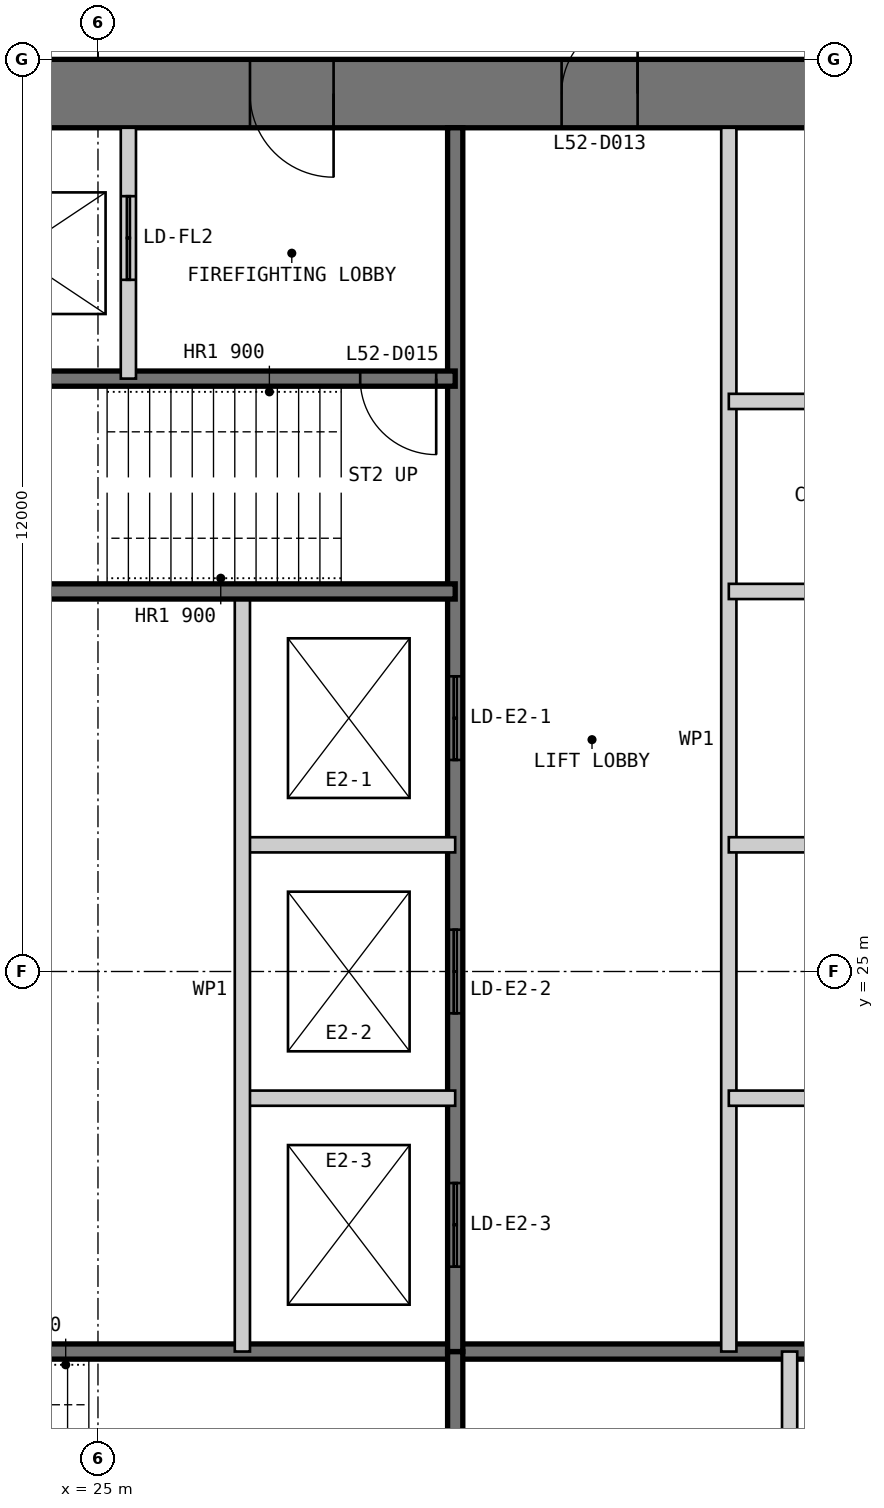
"""IFC4 building model, lengths in metres.
Left out: names, types, materials, properties, quantities, classifications, styles, units other than length and angle.
Written with IfcOpenShell. Run it as: python <this file> out.ifc"""

import sys

from ifc_helpers import new_model, si_unit, direction, frame, frame_2d, origin, place, context, subcontext, project, spatial, polyline, rectangle, outline, extrude, element, fill, save


model = new_model("IFC4")
c1 = context("Model", 3, precision=1e-05, world=origin(), true_north=direction((0.0, 1.0)))
c2 = subcontext(c1, "Body", "Model", "MODEL_VIEW")
j1 = project(units=[si_unit("LENGTHUNIT", "METRE"), si_unit("PLANEANGLEUNIT", "RADIAN")], contexts=[c1])
p1 = place(None, origin())
s1 = spatial("IfcSite", under=j1, at=p1, CompositionType="ELEMENT")
p2 = place(p1, origin())
s2 = spatial("IfcBuilding", under=s1, at=p2, CompositionType="ELEMENT")
p3 = place(p2, frame((0.0, 0.0, 221.8)))
s3 = spatial("IfcBuildingStorey", under=s2, at=p3, CompositionType="ELEMENT", Elevation=221.8)
p4 = place(p3, frame((37.0, 36.55, 0.0), z_axis=(0.0, 0.0, 1.0), x_axis=(-1.0, 0.0, 0.0)))
e1 = element("IfcWall", 1, at=p4, inside=s3, PredefinedType="SHEAR", context=c2, shape_type="SweptSolid", body=[
    extrude(outline(polyline([(0.0, -0.45), (24.0, -0.45), (23.1, 0.45), (0.9, 0.45), (0.0, -0.45)])), origin(), (0.0, 0.0, 1.0), 4.0),
])
p5 = place(p4, frame((4.9, 0.0, 0.0)))
e2 = element("IfcOpeningElement", 2, at=p5, cuts=e1, PredefinedType="OPENING", context=c2, shape_type="SweptSolid", body=[
    extrude(rectangle(XDim=1.0, YDim=2.2, at=frame_2d((0.5, 1.1))), frame((0.0, 0.46, 0.0), z_axis=(0.0, -1.0, 0.0), x_axis=(1.0, 0.0, 0.0)), (0.0, 0.0, 1.0), 0.92),
])
p6 = place(p4, frame((8.9, 0.0, 0.0)))
e3 = element("IfcOpeningElement", 3, at=p6, cuts=e1, PredefinedType="OPENING", context=c2, shape_type="SweptSolid", body=[
    extrude(rectangle(XDim=1.1, YDim=2.2, at=frame_2d((0.55, 1.1))), frame((0.0, 0.46, 0.0), z_axis=(0.0, -1.0, 0.0), x_axis=(1.0, 0.0, 0.0)), (0.0, 0.0, 1.0), 0.92),
])
p7 = place(p4, frame((15.05, 0.0, 0.0)))
e4 = element("IfcOpeningElement", 4, at=p7, cuts=e1, PredefinedType="OPENING", context=c2, shape_type="SweptSolid", body=[
    extrude(rectangle(XDim=0.9, YDim=2.2, at=frame_2d((0.45, 1.1))), frame((0.0, 0.46, 0.0), z_axis=(0.0, -1.0, 0.0), x_axis=(1.0, 0.0, 0.0)), (0.0, 0.0, 1.0), 0.92),
])
p8 = place(p4, frame((17.9, 0.0, 0.0)))
e5 = element("IfcOpeningElement", 5, at=p8, cuts=e1, PredefinedType="OPENING", context=c2, shape_type="SweptSolid", body=[
    extrude(rectangle(XDim=1.0, YDim=2.2, at=frame_2d((0.5, 1.1))), frame((0.0, 0.46, 0.0), z_axis=(0.0, -1.0, 0.0), x_axis=(1.0, 0.0, 0.0)), (0.0, 0.0, 1.0), 0.92),
])
p9 = place(p4, frame((21.4, 0.0, 0.0)))
e6 = element("IfcOpeningElement", 6, at=p9, cuts=e1, PredefinedType="OPENING", context=c2, shape_type="SweptSolid", body=[
    extrude(rectangle(XDim=1.0, YDim=2.2, at=frame_2d((0.5, 1.1))), frame((0.0, 0.46, 0.0), z_axis=(0.0, -1.0, 0.0), x_axis=(1.0, 0.0, 0.0)), (0.0, 0.0, 1.0), 0.92),
])
p10 = place(p3, frame((20.3, 20.0, 0.0), z_axis=(0.0, 0.0, 1.0), x_axis=(1.0, 0.0, 0.0)))
e7 = element("IfcWall", 7, at=p10, inside=s3, PredefinedType="SOLIDWALL", context=c2, shape_type="SweptSolid", body=[
    extrude(rectangle(XDim=15.8, YDim=0.2, at=frame_2d((7.9, 0.0))), origin(), (0.0, 0.0, 1.0), 3.8),
])
p11 = place(p3, frame((29.7, 13.9, 0.0), z_axis=(0.0, 0.0, 1.0), x_axis=(0.0, 1.0, 0.0)))
e8 = element("IfcWall", 8, at=p11, inside=s3, PredefinedType="SOLIDWALL", context=c2, shape_type="SweptSolid", body=[
    extrude(rectangle(XDim=6.1, YDim=0.2, at=frame_2d((3.05, 0.0))), origin(), (0.0, 0.0, 1.0), 3.8),
])
p12 = place(p3, frame((34.1, 13.9, 0.0), z_axis=(0.0, 0.0, 1.0), x_axis=(0.0, 1.0, 0.0)))
e9 = element("IfcWall", 9, at=p12, inside=s3, PredefinedType="PARTITIONING", context=c2, shape_type="SweptSolid", body=[
    extrude(rectangle(XDim=6.1, YDim=0.2, at=frame_2d((3.05, 0.0))), origin(), (0.0, 0.0, 1.0), 3.8),
])
p13 = place(p3, frame((33.3, 36.1, 0.0), z_axis=(0.0, 0.0, 1.0), x_axis=(0.0, -1.0, 0.0)))
e10 = element("IfcWall", 10, at=p13, inside=s3, PredefinedType="PARTITIONING", context=c2, shape_type="SweptSolid", body=[
    extrude(rectangle(XDim=16.1, YDim=0.2, at=frame_2d((8.05, 0.0))), origin(), (0.0, 0.0, 1.0), 3.8),
])
p14 = place(p3, frame((29.7, 36.1, 0.0), z_axis=(0.0, 0.0, 1.0), x_axis=(0.0, -1.0, 0.0)))
e11 = element("IfcWall", 11, at=p14, inside=s3, PredefinedType="SOLIDWALL", context=c2, shape_type="SweptSolid", body=[
    extrude(rectangle(XDim=16.1, YDim=0.2, at=frame_2d((8.05, 0.0))), origin(), (0.0, 0.0, 1.0), 3.8),
])
p15 = place(p14, frame((7.217, 0.0, 0.0)))
e12 = element("IfcOpeningElement", 12, at=p15, cuts=e11, PredefinedType="OPENING", context=c2, shape_type="SweptSolid", body=[
    extrude(rectangle(XDim=1.1, YDim=2.2, at=frame_2d((0.55, 1.1))), frame((0.0, 0.11, 0.0), z_axis=(0.0, -1.0, 0.0), x_axis=(1.0, 0.0, 0.0)), (0.0, 0.0, 1.0), 0.22),
])
p16 = place(p14, frame((10.55, 0.0, 0.0)))
e13 = element("IfcOpeningElement", 13, at=p16, cuts=e11, PredefinedType="OPENING", context=c2, shape_type="SweptSolid", body=[
    extrude(rectangle(XDim=1.1, YDim=2.2, at=frame_2d((0.55, 1.1))), frame((0.0, 0.11, 0.0), z_axis=(0.0, -1.0, 0.0), x_axis=(1.0, 0.0, 0.0)), (0.0, 0.0, 1.0), 0.22),
])
p17 = place(p14, frame((13.883, 0.0, 0.0)))
e14 = element("IfcOpeningElement", 14, at=p17, cuts=e11, PredefinedType="OPENING", context=c2, shape_type="SweptSolid", body=[
    extrude(rectangle(XDim=1.1, YDim=2.2, at=frame_2d((0.55, 1.1))), frame((0.0, 0.11, 0.0), z_axis=(0.0, -1.0, 0.0), x_axis=(1.0, 0.0, 0.0)), (0.0, 0.0, 1.0), 0.22),
])
for number, where, z_axis, x_axis in (
    (15, (36.1, 30.0, 0.0), (0.0, 0.0, 1.0), (-1.0, 0.0, 0.0)),
    (16, (36.1, 26.667, 0.0), (0.0, 0.0, 1.0), (-1.0, 0.0, 0.0)),
    (17, (36.1, 23.333, 0.0), (0.0, 0.0, 1.0), (-1.0, 0.0, 0.0)),
    (18, (29.7, 26.667, 0.0), (0.0, 0.0, 1.0), (-1.0, 0.0, 0.0)),
    (19, (29.7, 23.333, 0.0), (0.0, 0.0, 1.0), (-1.0, 0.0, 0.0)),
):
    element("IfcWall", number, at=place(p3, frame(where, z_axis=z_axis, x_axis=x_axis)), inside=s3, PredefinedType="PARTITIONING", context=c2, shape_type="SweptSolid", body=[
        extrude(rectangle(XDim=2.8, YDim=0.2, at=frame_2d((1.4, 0.0))), origin(), (0.0, 0.0, 1.0), 3.8),
    ])
p18 = place(p3, frame((26.9, 30.0, 0.0), z_axis=(0.0, 0.0, 1.0), x_axis=(0.0, -1.0, 0.0)))
e20 = element("IfcWall", 20, at=p18, inside=s3, PredefinedType="PARTITIONING", context=c2, shape_type="SweptSolid", body=[
    extrude(rectangle(XDim=10.0, YDim=0.2, at=frame_2d((5.0, 0.0))), origin(), (0.0, 0.0, 1.0), 3.8),
])
p19 = place(p3, frame((29.7, 32.8, 0.0), z_axis=(0.0, 0.0, 1.0), x_axis=(-1.0, 0.0, 0.0)))
e21 = element("IfcWall", 21, at=p19, inside=s3, PredefinedType="SOLIDWALL", context=c2, shape_type="SweptSolid", body=[
    extrude(rectangle(XDim=9.4, YDim=0.2, at=frame_2d((4.7, 0.0))), origin(), (0.0, 0.0, 1.0), 3.8),
])
p20 = place(p19, frame((0.25, 0.0, 0.0)))
e22 = element("IfcOpeningElement", 22, at=p20, cuts=e21, PredefinedType="OPENING", context=c2, shape_type="SweptSolid", body=[
    extrude(rectangle(XDim=1.0, YDim=2.2, at=frame_2d((0.5, 1.1))), frame((0.0, 0.11, 0.0), z_axis=(0.0, -1.0, 0.0), x_axis=(1.0, 0.0, 0.0)), (0.0, 0.0, 1.0), 0.22),
])
p21 = place(p3, frame((29.7, 30.0, 0.0), z_axis=(0.0, 0.0, 1.0), x_axis=(-1.0, 0.0, 0.0)))
e23 = element("IfcWall", 23, at=p21, inside=s3, PredefinedType="SOLIDWALL", context=c2, shape_type="SweptSolid", body=[
    extrude(rectangle(XDim=15.8, YDim=0.2, at=frame_2d((7.9, 0.0))), origin(), (0.0, 0.0, 1.0), 3.8),
])
p22 = place(p3, frame((25.4, 36.1, 0.0), z_axis=(0.0, 0.0, 1.0), x_axis=(0.0, -1.0, 0.0)))
e24 = element("IfcWall", 24, at=p22, inside=s3, PredefinedType="PARTITIONING", context=c2, shape_type="SweptSolid", body=[
    extrude(rectangle(XDim=3.3, YDim=0.2, at=frame_2d((1.65, 0.0))), origin(), (0.0, 0.0, 1.0), 3.8),
])
p23 = place(p22, frame((0.9, 0.0, 0.0)))
e25 = element("IfcOpeningElement", 25, at=p23, cuts=e24, PredefinedType="OPENING", context=c2, shape_type="SweptSolid", body=[
    extrude(rectangle(XDim=1.1, YDim=2.2, at=frame_2d((0.55, 1.1))), frame((0.0, 0.11, 0.0), z_axis=(0.0, -1.0, 0.0), x_axis=(1.0, 0.0, 0.0)), (0.0, 0.0, 1.0), 0.22),
])
p24 = place(p3, frame((36.1, 32.5, 0.0), z_axis=(0.0, 0.0, 1.0), x_axis=(-1.0, 0.0, 0.0)))
e26 = element("IfcWall", 26, at=p24, inside=s3, PredefinedType="PARTITIONING", context=c2, shape_type="SweptSolid", body=[
    extrude(rectangle(XDim=2.8, YDim=0.2, at=frame_2d((1.4, 0.0))), origin(), (0.0, 0.0, 1.0), 3.8),
])
p25 = place(p5, frame((1.0, 0.0, 0.0), z_axis=(0.0, 0.0, 1.0), x_axis=(-1.0, 0.0, 0.0)))
e27 = element("IfcDoor", 27, at=p25, inside=s3, OperationType="SINGLE_SWING_RIGHT", PredefinedType="DOOR", context=c2, shape_type="SweptSolid", body=[
    extrude(rectangle(XDim=1.0, YDim=2.2, at=frame_2d((0.5, 1.1))), frame((0.0, 0.025, 0.0), z_axis=(0.0, -1.0, 0.0), x_axis=(1.0, 0.0, 0.0)), (0.0, 0.0, 1.0), 0.05),
    extrude(outline(polyline([(0.0, 0.0), (0.04, 0.0), (0.04, 2.16), (0.96, 2.16), (0.96, 0.0), (1.0, 0.0), (1.0, 2.2), (0.0, 2.2), (0.0, 0.0)])), frame((0.0, 0.3, 0.0), z_axis=(0.0, -1.0, 0.0), x_axis=(1.0, 0.0, 0.0)), (0.0, 0.0, 1.0), 0.6),
])
fill(e2, e27)
p26 = place(p6, origin())
e28 = element("IfcDoor", 28, at=p26, inside=s3, OperationType="SINGLE_SWING_LEFT", PredefinedType="DOOR", context=c2, shape_type="SweptSolid", body=[
    extrude(rectangle(XDim=1.1, YDim=2.2, at=frame_2d((0.55, 1.1))), frame((0.0, 0.025, 0.0), z_axis=(0.0, -1.0, 0.0), x_axis=(1.0, 0.0, 0.0)), (0.0, 0.0, 1.0), 0.05),
    extrude(outline(polyline([(0.0, 0.0), (0.04, 0.0), (0.04, 2.16), (1.06, 2.16), (1.06, 0.0), (1.1, 0.0), (1.1, 2.2), (0.0, 2.2), (0.0, 0.0)])), frame((0.0, 0.3, 0.0), z_axis=(0.0, -1.0, 0.0), x_axis=(1.0, 0.0, 0.0)), (0.0, 0.0, 1.0), 0.6),
])
fill(e3, e28)
p27 = place(p20, origin())
e29 = element("IfcDoor", 29, at=p27, inside=s3, OperationType="SINGLE_SWING_LEFT", PredefinedType="DOOR", context=c2, shape_type="SweptSolid", body=[
    extrude(rectangle(XDim=1.0, YDim=2.2, at=frame_2d((0.5, 1.1))), frame((0.0, 0.025, 0.0), z_axis=(0.0, -1.0, 0.0), x_axis=(1.0, 0.0, 0.0)), (0.0, 0.0, 1.0), 0.05),
])
fill(e22, e29)
p28 = place(p23, origin())
e30 = element("IfcDoor", 30, at=p28, inside=s3, OperationType="DOUBLE_DOOR_SLIDING", PredefinedType="DOOR", context=c2, shape_type="SweptSolid", body=[
    extrude(rectangle(XDim=1.1, YDim=2.2, at=frame_2d((0.55, 1.1))), frame((0.0, 0.025, 0.0), z_axis=(0.0, -1.0, 0.0), x_axis=(1.0, 0.0, 0.0)), (0.0, 0.0, 1.0), 0.05),
])
fill(e25, e30)
p29 = place(p15, origin())
e31 = element("IfcDoor", 31, at=p29, inside=s3, OperationType="DOUBLE_DOOR_SLIDING", PredefinedType="DOOR", context=c2, shape_type="SweptSolid", body=[
    extrude(rectangle(XDim=1.1, YDim=2.2, at=frame_2d((0.55, 1.1))), frame((0.0, 0.025, 0.0), z_axis=(0.0, -1.0, 0.0), x_axis=(1.0, 0.0, 0.0)), (0.0, 0.0, 1.0), 0.05),
])
fill(e12, e31)
p30 = place(p16, origin())
e32 = element("IfcDoor", 32, at=p30, inside=s3, OperationType="DOUBLE_DOOR_SLIDING", PredefinedType="DOOR", context=c2, shape_type="SweptSolid", body=[
    extrude(rectangle(XDim=1.1, YDim=2.2, at=frame_2d((0.55, 1.1))), frame((0.0, 0.025, 0.0), z_axis=(0.0, -1.0, 0.0), x_axis=(1.0, 0.0, 0.0)), (0.0, 0.0, 1.0), 0.05),
])
fill(e13, e32)
p31 = place(p17, origin())
e33 = element("IfcDoor", 33, at=p31, inside=s3, OperationType="DOUBLE_DOOR_SLIDING", PredefinedType="DOOR", context=c2, shape_type="SweptSolid", body=[
    extrude(rectangle(XDim=1.1, YDim=2.2, at=frame_2d((0.55, 1.1))), frame((0.0, 0.025, 0.0), z_axis=(0.0, -1.0, 0.0), x_axis=(1.0, 0.0, 0.0)), (0.0, 0.0, 1.0), 0.05),
])
fill(e14, e33)
save(model, sys.argv[1])
